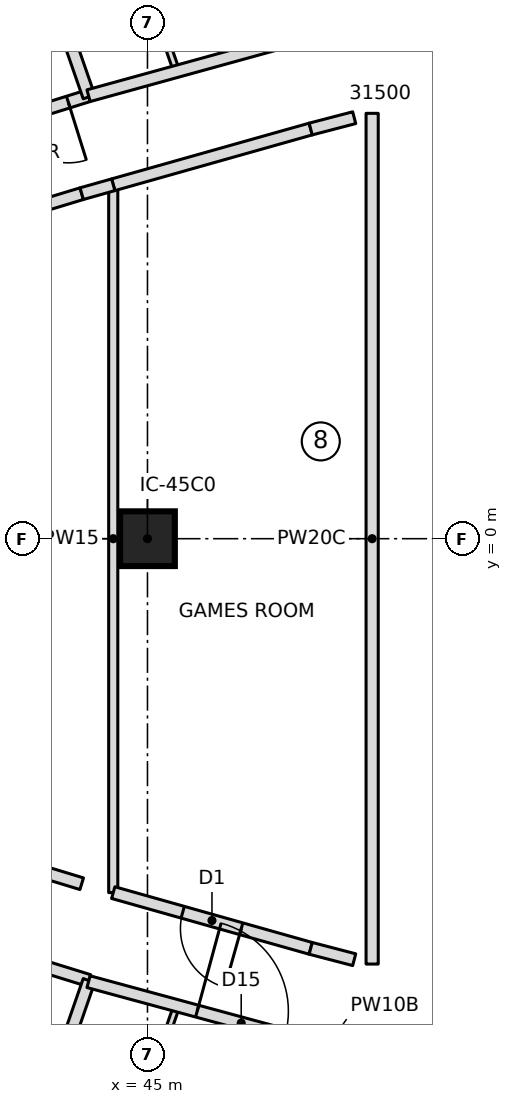
"""IFC4 building model, lengths in metres.
Left out: names, types, materials, properties, quantities, classifications, styles, units other than length and angle.
Written with IfcOpenShell. Run it as: python <this file> out.ifc"""

import sys

from ifc_helpers import new_model, si_unit, direction, frame, frame_2d, origin, origin_2d, place, context, subcontext, project, spatial, rectangle, extrude, element, fill, save


model = new_model("IFC4")
c1 = context("Model", 3, precision=1e-05, world=origin(), true_north=direction((0.0, 1.0)))
c2 = subcontext(c1, "Body", "Model", "MODEL_VIEW")
j1 = project(units=[si_unit("LENGTHUNIT", "METRE"), si_unit("PLANEANGLEUNIT", "RADIAN")], contexts=[c1])
p1 = place(None, origin())
s1 = spatial("IfcSite", under=j1, at=p1, CompositionType="ELEMENT")
p2 = place(p1, origin())
s2 = spatial("IfcBuilding", under=s1, at=p2, CompositionType="ELEMENT")
p3 = place(p2, frame((0.0, 0.0, 292.75)))
s3 = spatial("IfcBuildingStorey", under=s2, at=p3, CompositionType="ELEMENT", Elevation=292.75)
p4 = place(p3, frame((45.0, 0.0, 0.0), z_axis=(0.0, 0.0, 1.0), x_axis=(1.0, 0.0, 0.0)))
e1 = element("IfcColumn", 1, at=p4, inside=s3, PredefinedType="COLUMN", context=c2, shape_type="SweptSolid", body=[
    extrude(rectangle(XDim=0.9, YDim=0.9, at=origin_2d()), origin(), (0.0, 0.0, 1.0), 3.55),
])
p5 = place(p3, frame((44.031, 7.286, 0.0), z_axis=(0.0, 0.0, 1.0), x_axis=(-0.95441177989, -0.29849313963, 0.0)))
e2 = element("IfcWall", 2, at=p5, inside=s3, PredefinedType="PARTITIONING", context=c2, shape_type="SweptSolid", body=[
    extrude(rectangle(XDim=8.348, YDim=0.2, at=frame_2d((4.174, 0.0))), origin(), (0.0, 0.0, 1.0), 3.25),
])
p6 = place(p5, frame((0.35, 0.0, 0.0)))
e3 = element("IfcOpeningElement", 3, at=p6, cuts=e2, PredefinedType="OPENING", context=c2, shape_type="SweptSolid", body=[
    extrude(rectangle(XDim=1.0, YDim=2.1, at=frame_2d((0.5, 1.05))), frame((0.0, 0.11, 0.0), z_axis=(0.0, -1.0, 0.0), x_axis=(1.0, 0.0, 0.0)), (0.0, 0.0, 1.0), 0.22),
])
p7 = place(p3, frame((44.038, 7.267, 0.0), z_axis=(0.0, 0.0, 1.0), x_axis=(-0.327714576096, 0.944776776077, 0.0)))
e4 = element("IfcWall", 4, at=p7, inside=s3, PredefinedType="PARTITIONING", context=c2, shape_type="SweptSolid", body=[
    extrude(rectangle(XDim=9.717, YDim=0.2, at=frame_2d((4.858, 0.0))), origin(), (0.0, 0.0, 1.0), 3.25),
])
p8 = place(p3, frame((45.476, 7.697, 0.0), z_axis=(0.0, 0.0, 1.0), x_axis=(-0.327723446833, 0.944773699039, 0.0)))
e5 = element("IfcWall", 5, at=p8, inside=s3, PredefinedType="PARTITIONING", context=c2, shape_type="SweptSolid", body=[
    extrude(rectangle(XDim=0.903, YDim=0.1, at=frame_2d((0.451, 0.0))), origin(), (0.0, 0.0, 1.0), 3.25),
])
p9 = place(p3, frame((36.064, -4.794, 0.0), z_axis=(0.0, 0.0, 1.0), x_axis=(0.955129200503, -0.296189483855, 0.0)))
e6 = element("IfcWall", 6, at=p9, inside=s3, PredefinedType="PARTITIONING", context=c2, shape_type="SweptSolid", body=[
    extrude(rectangle(XDim=8.348, YDim=0.2, at=frame_2d((4.174, 0.0))), origin(), (0.0, 0.0, 1.0), 3.25),
])
p10 = place(p9, frame((3.05, 0.0, 0.0)))
e7 = element("IfcOpeningElement", 7, at=p10, cuts=e6, PredefinedType="OPENING", context=c2, shape_type="SweptSolid", body=[
    extrude(rectangle(XDim=1.5, YDim=2.1, at=frame_2d((0.75, 1.05))), frame((0.0, 0.11, 0.0), z_axis=(0.0, -1.0, 0.0), x_axis=(1.0, 0.0, 0.0)), (0.0, 0.0, 1.0), 0.22),
])
p11 = place(p3, frame((40.854, -16.447, 0.0), z_axis=(0.0, 0.0, 1.0), x_axis=(0.327714576096, 0.944776776077, 0.0)))
e8 = element("IfcWall", 8, at=p11, inside=s3, PredefinedType="PARTITIONING", context=c2, shape_type="SweptSolid", body=[
    extrude(rectangle(XDim=9.717, YDim=0.2, at=frame_2d((4.858, 0.0))), origin(), (0.0, 0.0, 1.0), 3.25),
])
p12 = place(p3, frame((45.18, -8.55, 0.0), z_axis=(0.0, 0.0, 1.0), x_axis=(0.327723446833, 0.944773699039, 0.0)))
e9 = element("IfcWall", 9, at=p12, inside=s3, PredefinedType="PARTITIONING", context=c2, shape_type="SweptSolid", body=[
    extrude(rectangle(XDim=0.903, YDim=0.1, at=frame_2d((0.451, 0.0))), origin(), (0.0, 0.0, 1.0), 3.25),
])
p13 = place(p3, frame((40.175, 4.536, 0.0), z_axis=(0.0, 0.0, 1.0), x_axis=(0.956723737069, 0.29099775073, 0.0)))
e10 = element("IfcWall", 10, at=p13, inside=s3, PredefinedType="PARTITIONING", context=c2, shape_type="SweptSolid", body=[
    extrude(rectangle(XDim=3.913, YDim=0.2, at=frame_2d((1.957, 0.0))), origin(), (0.0, 0.0, 1.0), 3.25),
])
p14 = place(p13, frame((1.457, 0.0, 0.0)))
e11 = element("IfcOpeningElement", 11, at=p14, cuts=e10, PredefinedType="OPENING", context=c2, shape_type="SweptSolid", body=[
    extrude(rectangle(XDim=1.0, YDim=2.1, at=frame_2d((0.5, 1.05))), frame((0.0, 0.11, 0.0), z_axis=(0.0, -1.0, 0.0), x_axis=(1.0, 0.0, 0.0)), (0.0, 0.0, 1.0), 0.22),
])
p15 = place(p3, frame((43.918, -5.675, 0.0), z_axis=(0.0, 0.0, 1.0), x_axis=(-0.956723737069, 0.29099775073, 0.0)))
e12 = element("IfcWall", 12, at=p15, inside=s3, PredefinedType="PARTITIONING", context=c2, shape_type="SweptSolid", body=[
    extrude(rectangle(XDim=3.913, YDim=0.2, at=frame_2d((1.957, 0.0))), origin(), (0.0, 0.0, 1.0), 3.25),
])
p16 = place(p3, frame((44.437, -5.821, 0.0), z_axis=(0.0, 0.0, 1.0), x_axis=(0.0, 1.0, 0.0)))
e13 = element("IfcWall", 13, at=p16, inside=s3, PredefinedType="PARTITIONING", context=c2, shape_type="SweptSolid", body=[
    extrude(rectangle(XDim=11.642, YDim=0.15, at=frame_2d((5.821, 0.0))), origin(), (0.0, 0.0, 1.0), 3.25),
])
p17 = place(p3, frame((47.684, -6.738, 0.0), z_axis=(0.0, 0.0, 1.0), x_axis=(-0.962403613575, 0.271623424206, 0.0)))
e14 = element("IfcWall", 14, at=p17, inside=s3, PredefinedType="PARTITIONING", context=c2, shape_type="SweptSolid", body=[
    extrude(rectangle(XDim=3.374, YDim=0.2, at=frame_2d((1.687, 0.0))), origin(), (0.0, 0.0, 1.0), 3.25),
])
p18 = place(p17, frame((1.187, 0.0, 0.0)))
e15 = element("IfcOpeningElement", 15, at=p18, cuts=e14, PredefinedType="OPENING", context=c2, shape_type="SweptSolid", body=[
    extrude(rectangle(XDim=1.0, YDim=2.1, at=frame_2d((0.5, 1.05))), frame((0.0, 0.11, 0.0), z_axis=(0.0, -1.0, 0.0), x_axis=(1.0, 0.0, 0.0)), (0.0, 0.0, 1.0), 0.22),
])
p19 = place(p3, frame((44.437, 5.821, 0.0), z_axis=(0.0, 0.0, 1.0), x_axis=(0.962403613575, 0.271623424206, 0.0)))
e16 = element("IfcWall", 16, at=p19, inside=s3, PredefinedType="PARTITIONING", context=c2, shape_type="SweptSolid", body=[
    extrude(rectangle(XDim=3.374, YDim=0.2, at=frame_2d((1.687, 0.0))), origin(), (0.0, 0.0, 1.0), 3.25),
])
p20 = place(p3, frame((48.4, 8.49, 0.0), z_axis=(0.0, 0.0, 1.0), x_axis=(-0.964024043021, -0.265815056905, 0.0)))
e17 = element("IfcWall", 17, at=p20, inside=s3, PredefinedType="PARTITIONING", context=c2, shape_type="SweptSolid", body=[
    extrude(rectangle(XDim=4.532, YDim=0.2, at=frame_2d((2.266, 0.0))), origin(), (0.0, 0.0, 1.0), 3.25),
])
p21 = place(p3, frame((44.031, -7.286, 0.0), z_axis=(0.0, 0.0, 1.0), x_axis=(0.965107760304, -0.261853033211, 0.0)))
e18 = element("IfcWall", 18, at=p21, inside=s3, PredefinedType="PARTITIONING", context=c2, shape_type="SweptSolid", body=[
    extrude(rectangle(XDim=4.527, YDim=0.2, at=frame_2d((2.263, 0.0))), origin(), (0.0, 0.0, 1.0), 3.25),
])
p22 = place(p21, frame((1.851, 0.0, 0.0)))
e19 = element("IfcOpeningElement", 19, at=p22, cuts=e18, PredefinedType="OPENING", context=c2, shape_type="SweptSolid", body=[
    extrude(rectangle(XDim=1.5, YDim=2.1, at=frame_2d((0.75, 1.05))), frame((0.0, 0.11, 0.0), z_axis=(0.0, -1.0, 0.0), x_axis=(1.0, 0.0, 0.0)), (0.0, 0.0, 1.0), 0.22),
])
for number, where, z_axis, x_axis in (
    (20, (47.684, 6.738, 0.0), (0.0, 0.0, 1.0), (0.968, 0.253, 0.0)),
    (21, (48.4, -6.924, 0.0), (0.0, 0.0, 1.0), (-0.968, 0.253, 0.0)),
):
    element("IfcWall", number, at=place(p3, frame(where, z_axis=z_axis, x_axis=x_axis)), inside=s3, PredefinedType="PARTITIONING", context=c2, shape_type="SweptSolid", body=[
        extrude(rectangle(XDim=0.74, YDim=0.2, at=frame_2d((0.37, 0.0))), origin(), (0.0, 0.0, 1.0), 3.25),
    ])
p23 = place(p3, frame((48.695, 6.996, 0.0), z_axis=(0.0, 0.0, 1.0), x_axis=(0.0, -1.0, 0.0)))
e22 = element("IfcWall", 22, at=p23, inside=s3, PredefinedType="PARTITIONING", context=c2, shape_type="SweptSolid", body=[
    extrude(rectangle(XDim=13.992, YDim=0.2, at=frame_2d((6.996, 0.0))), origin(), (0.0, 0.0, 1.0), 3.25),
])
p24 = place(p3, frame((43.918, 5.675, 0.0), z_axis=(0.0, 0.0, 1.0), x_axis=(0.9624587823, 0.271427876929, 0.0)))
e23 = element("IfcWall", 23, at=p24, inside=s3, PredefinedType="PARTITIONING", context=c2, shape_type="SweptSolid", body=[
    extrude(rectangle(XDim=0.539, YDim=0.2, at=frame_2d((0.27, 0.0))), origin(), (0.0, 0.0, 1.0), 3.25),
])
p25 = place(p6, origin())
e24 = element("IfcDoor", 24, at=p25, inside=s3, OperationType="SINGLE_SWING_RIGHT", PredefinedType="DOOR", context=c2, shape_type="SweptSolid", body=[
    extrude(rectangle(XDim=1.0, YDim=2.1, at=frame_2d((0.5, 1.05))), frame((0.0, 0.025, 0.0), z_axis=(0.0, -1.0, 0.0), x_axis=(1.0, 0.0, 0.0)), (0.0, 0.0, 1.0), 0.05),
])
fill(e3, e24)
p26 = place(p22, origin())
e25 = element("IfcDoor", 25, at=p26, inside=s3, OperationType="DOUBLE_DOOR_SINGLE_SWING", PredefinedType="DOOR", context=c2, shape_type="SweptSolid", body=[
    extrude(rectangle(XDim=1.5, YDim=2.1, at=frame_2d((0.75, 1.05))), frame((0.0, 0.025, 0.0), z_axis=(0.0, -1.0, 0.0), x_axis=(1.0, 0.0, 0.0)), (0.0, 0.0, 1.0), 0.05),
])
fill(e19, e25)
p27 = place(p18, origin())
e26 = element("IfcDoor", 26, at=p27, inside=s3, OperationType="SINGLE_SWING_LEFT", PredefinedType="DOOR", context=c2, shape_type="SweptSolid", body=[
    extrude(rectangle(XDim=1.0, YDim=2.1, at=frame_2d((0.5, 1.05))), frame((0.0, 0.025, 0.0), z_axis=(0.0, -1.0, 0.0), x_axis=(1.0, 0.0, 0.0)), (0.0, 0.0, 1.0), 0.05),
])
fill(e15, e26)
save(model, sys.argv[1])
